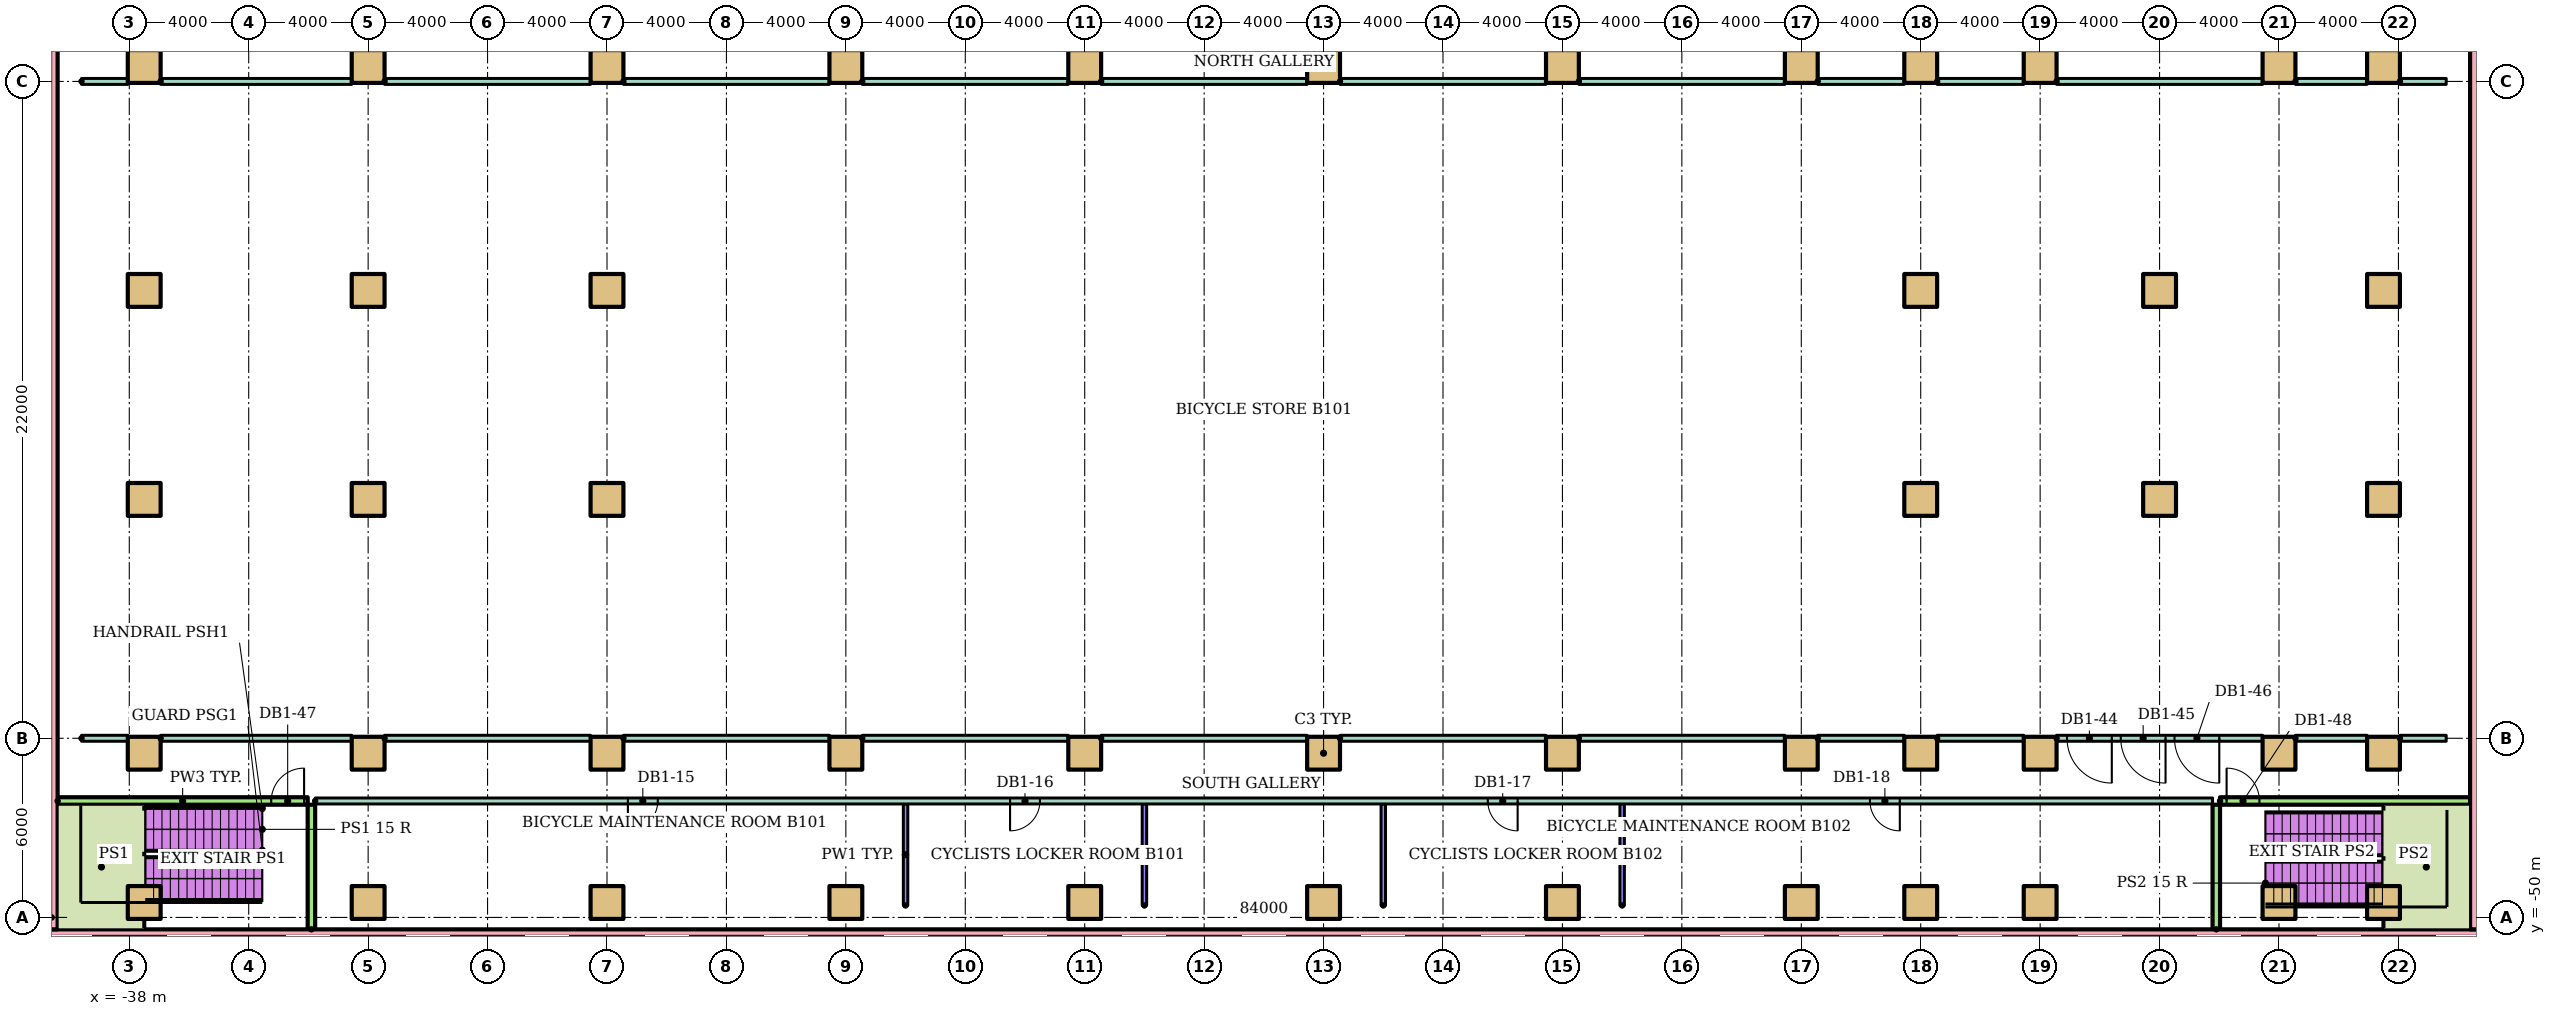
"""IFC4 building model, lengths in metres.
Left out: names, types, materials, properties, quantities, classifications, styles, units other than length and angle.
Written with IfcOpenShell. Run it as: python <this file> out.ifc"""

import sys

from ifc_helpers import new_model, si_unit, direction, frame, frame_2d, origin, origin_2d, place, context, subcontext, project, spatial, rectangle, extrude, element, fill, save


model = new_model("IFC4")
c1 = context("Model", 3, precision=1e-05, world=origin(), true_north=direction((0.0, 1.0)))
c2 = subcontext(c1, "Body", "Model", "MODEL_VIEW")
j1 = project(units=[si_unit("LENGTHUNIT", "METRE"), si_unit("PLANEANGLEUNIT", "RADIAN")], contexts=[c1])
p1 = place(None, origin())
s1 = spatial("IfcSite", under=j1, at=p1, CompositionType="ELEMENT")
p2 = place(p1, origin())
s2 = spatial("IfcBuilding", under=s1, at=p2, CompositionType="ELEMENT")
p3 = place(p2, frame((0.0, 0.0, -5.0)))
s3 = spatial("IfcBuildingStorey", under=s2, at=p3, CompositionType="ELEMENT", Elevation=-5.0)
p4 = place(p3, frame((-41.0, -50.7, -0.35)))
e1 = element("IfcWall", 1, at=p4, inside=s3, PredefinedType="SOLIDWALL", context=c2, shape_type="SweptSolid", body=[
    extrude(rectangle(XDim=82.0, YDim=0.6, at=frame_2d((41.0, 0.0))), origin(), (0.0, 0.0, 1.0), 4.93),
])
for number, where, z_axis, x_axis in (
    (2, (-40.7, -50.4, -0.35), (0.0, 0.0, 1.0), (0.0, 1.0, 0.0)),
    (3, (40.7, -50.4, -0.35), (0.0, 0.0, 1.0), (0.0, 1.0, 0.0)),
):
    element("IfcWall", number, at=place(p3, frame(where, z_axis=z_axis, x_axis=x_axis)), inside=s3, PredefinedType="SOLIDWALL", context=c2, shape_type="SweptSolid", body=[
        extrude(rectangle(XDim=70.8, YDim=0.6, at=frame_2d((35.4, 0.0))), origin(), (0.0, 0.0, 1.0), 4.93),
    ])
for number, where in (
    (4, (-37.5, -49.5, 0.0)),
    (5, (-30.0, -49.5, 0.0)),
    (6, (-22.0, -49.5, 0.0)),
    (7, (-14.0, -49.5, 0.0)),
    (8, (-6.0, -49.5, 0.0)),
    (9, (2.0, -49.5, 0.0)),
    (10, (10.0, -49.5, 0.0)),
    (11, (18.0, -49.5, 0.0)),
    (12, (22.0, -49.5, 0.0)),
    (13, (26.0, -49.5, 0.0)),
    (14, (34.0, -49.5, 0.0)),
    (15, (37.5, -49.5, 0.0)),
    (16, (-37.5, -44.5, 0.0)),
    (17, (-30.0, -44.5, 0.0)),
    (18, (-22.0, -44.5, 0.0)),
    (19, (-14.0, -44.5, 0.0)),
    (20, (-6.0, -44.5, 0.0)),
    (21, (2.0, -44.5, 0.0)),
    (22, (10.0, -44.5, 0.0)),
    (23, (18.0, -44.5, 0.0)),
    (24, (22.0, -44.5, 0.0)),
    (25, (26.0, -44.5, 0.0)),
    (26, (34.0, -44.5, 0.0)),
    (27, (37.5, -44.5, 0.0)),
    (28, (-37.5, -36.0, 0.0)),
    (29, (-30.0, -36.0, 0.0)),
    (30, (-22.0, -36.0, 0.0)),
    (31, (22.0, -36.0, 0.0)),
    (32, (30.0, -36.0, 0.0)),
    (33, (37.5, -36.0, 0.0)),
    (34, (-37.5, -29.0, 0.0)),
    (35, (-30.0, -29.0, 0.0)),
    (36, (-22.0, -29.0, 0.0)),
    (37, (22.0, -29.0, 0.0)),
    (38, (30.0, -29.0, 0.0)),
    (39, (37.5, -29.0, 0.0)),
    (40, (-37.5, -21.5, 0.0)),
    (41, (-30.0, -21.5, 0.0)),
    (42, (-22.0, -21.5, 0.0)),
    (43, (-14.0, -21.5, 0.0)),
    (44, (-6.0, -21.5, 0.0)),
    (45, (2.0, -21.5, 0.0)),
    (46, (10.0, -21.5, 0.0)),
    (47, (18.0, -21.5, 0.0)),
    (48, (22.0, -21.5, 0.0)),
    (49, (26.0, -21.5, 0.0)),
    (50, (34.0, -21.5, 0.0)),
    (51, (37.5, -21.5, 0.0)),
):
    element("IfcColumn", number, at=place(p3, frame(where)), inside=s3, PredefinedType="COLUMN", context=c2, shape_type="SweptSolid", body=[
        extrude(rectangle(XDim=1.1, YDim=1.1, at=origin_2d()), origin(), (0.0, 0.0, 1.0), 5.0),
    ])
p5 = place(p3, frame((-31.775, -46.1, 0.0)))
e52 = element("IfcWall", 52, at=p5, inside=s3, PredefinedType="PARTITIONING", context=c2, shape_type="SweptSolid", body=[
    extrude(rectangle(XDim=63.55, YDim=0.2, at=frame_2d((31.775, 0.0))), origin(), (0.0, 0.0, 1.0), 4.58),
])
p6 = place(p5, frame((10.475, 0.0, 0.0)))
e53 = element("IfcOpeningElement", 53, at=p6, cuts=e52, PredefinedType="OPENING", context=c2, shape_type="SweptSolid", body=[
    extrude(rectangle(XDim=1.0, YDim=2.1, at=frame_2d((0.5, 1.05))), frame((0.0, 0.11, 0.0), z_axis=(0.0, -1.0, 0.0), x_axis=(1.0, 0.0, 0.0)), (0.0, 0.0, 1.0), 0.22),
])
p7 = place(p5, frame((23.275, 0.0, 0.0)))
e54 = element("IfcOpeningElement", 54, at=p7, cuts=e52, PredefinedType="OPENING", context=c2, shape_type="SweptSolid", body=[
    extrude(rectangle(XDim=1.0, YDim=2.1, at=frame_2d((0.5, 1.05))), frame((0.0, 0.11, 0.0), z_axis=(0.0, -1.0, 0.0), x_axis=(1.0, 0.0, 0.0)), (0.0, 0.0, 1.0), 0.22),
])
p8 = place(p5, frame((39.275, 0.0, 0.0)))
e55 = element("IfcOpeningElement", 55, at=p8, cuts=e52, PredefinedType="OPENING", context=c2, shape_type="SweptSolid", body=[
    extrude(rectangle(XDim=1.0, YDim=2.1, at=frame_2d((0.5, 1.05))), frame((0.0, 0.11, 0.0), z_axis=(0.0, -1.0, 0.0), x_axis=(1.0, 0.0, 0.0)), (0.0, 0.0, 1.0), 0.22),
])
p9 = place(p5, frame((52.075, 0.0, 0.0)))
e56 = element("IfcOpeningElement", 56, at=p9, cuts=e52, PredefinedType="OPENING", context=c2, shape_type="SweptSolid", body=[
    extrude(rectangle(XDim=1.0, YDim=2.1, at=frame_2d((0.5, 1.05))), frame((0.0, 0.11, 0.0), z_axis=(0.0, -1.0, 0.0), x_axis=(1.0, 0.0, 0.0)), (0.0, 0.0, 1.0), 0.22),
])
p10 = place(p3, frame((-40.4, -46.1, 0.0)))
e57 = element("IfcWall", 57, at=p10, inside=s3, PredefinedType="SOLIDWALL", context=c2, shape_type="SweptSolid", body=[
    extrude(rectangle(XDim=8.375, YDim=0.25, at=frame_2d((4.188, 0.0))), origin(), (0.0, 0.0, 1.0), 4.58),
])
p11 = place(p10, frame((7.155, 0.0, 0.0)))
e58 = element("IfcOpeningElement", 58, at=p11, cuts=e57, PredefinedType="OPENING", context=c2, shape_type="SweptSolid", body=[
    extrude(rectangle(XDim=1.1, YDim=2.1, at=frame_2d((0.55, 1.05))), frame((0.0, 0.135, 0.0), z_axis=(0.0, -1.0, 0.0), x_axis=(1.0, 0.0, 0.0)), (0.0, 0.0, 1.0), 0.27),
])
p12 = place(p3, frame((32.025, -46.1, 0.0)))
e59 = element("IfcWall", 59, at=p12, inside=s3, PredefinedType="SOLIDWALL", context=c2, shape_type="SweptSolid", body=[
    extrude(rectangle(XDim=8.375, YDim=0.25, at=frame_2d((4.188, 0.0))), origin(), (0.0, 0.0, 1.0), 4.58),
])
p13 = place(p12, frame((0.22, 0.0, 0.0)))
e60 = element("IfcOpeningElement", 60, at=p13, cuts=e59, PredefinedType="OPENING", context=c2, shape_type="SweptSolid", body=[
    extrude(rectangle(XDim=1.1, YDim=2.1, at=frame_2d((0.55, 1.05))), frame((0.0, 0.135, 0.0), z_axis=(0.0, -1.0, 0.0), x_axis=(1.0, 0.0, 0.0)), (0.0, 0.0, 1.0), 0.27),
])
p14 = place(p3, frame((-39.6, -44.0, 0.0)))
e61 = element("IfcWall", 61, at=p14, inside=s3, PredefinedType="PARTITIONING", context=c2, shape_type="SweptSolid", body=[
    extrude(rectangle(XDim=1.55, YDim=0.2, at=frame_2d((0.775, 0.0))), origin(), (0.0, 0.0, 1.0), 4.58),
])
p15 = place(p3, frame((-36.95, -44.0, 0.0)))
e62 = element("IfcWall", 62, at=p15, inside=s3, PredefinedType="PARTITIONING", context=c2, shape_type="SweptSolid", body=[
    extrude(rectangle(XDim=6.4, YDim=0.2, at=frame_2d((3.2, 0.0))), origin(), (0.0, 0.0, 1.0), 4.58),
])
for number, where in (
    (63, (-29.45, -44.0, 0.0)),
    (64, (-21.45, -44.0, 0.0)),
    (65, (-13.45, -44.0, 0.0)),
    (66, (-5.45, -44.0, 0.0)),
    (67, (2.55, -44.0, 0.0)),
    (68, (10.55, -44.0, 0.0)),
):
    element("IfcWall", number, at=place(p3, frame(where)), inside=s3, PredefinedType="PARTITIONING", context=c2, shape_type="SweptSolid", body=[
        extrude(rectangle(XDim=6.9, YDim=0.2, at=frame_2d((3.45, 0.0))), origin(), (0.0, 0.0, 1.0), 4.58),
    ])
for number, where in (
    (69, (18.55, -44.0, 0.0)),
    (70, (22.55, -44.0, 0.0)),
):
    element("IfcWall", number, at=place(p3, frame(where)), inside=s3, PredefinedType="PARTITIONING", context=c2, shape_type="SweptSolid", body=[
        extrude(rectangle(XDim=2.9, YDim=0.2, at=frame_2d((1.45, 0.0))), origin(), (0.0, 0.0, 1.0), 4.58),
    ])
p16 = place(p3, frame((26.55, -44.0, 0.0)))
e71 = element("IfcWall", 71, at=p16, inside=s3, PredefinedType="PARTITIONING", context=c2, shape_type="SweptSolid", body=[
    extrude(rectangle(XDim=6.9, YDim=0.2, at=frame_2d((3.45, 0.0))), origin(), (0.0, 0.0, 1.0), 4.58),
])
p17 = place(p16, frame((0.35, 0.0, 0.0)))
e72 = element("IfcOpeningElement", 72, at=p17, cuts=e71, PredefinedType="OPENING", context=c2, shape_type="SweptSolid", body=[
    extrude(rectangle(XDim=1.5, YDim=2.1, at=frame_2d((0.75, 1.05))), frame((0.0, 0.11, 0.0), z_axis=(0.0, -1.0, 0.0), x_axis=(1.0, 0.0, 0.0)), (0.0, 0.0, 1.0), 0.22),
])
p18 = place(p16, frame((2.15, 0.0, 0.0)))
e73 = element("IfcOpeningElement", 73, at=p18, cuts=e71, PredefinedType="OPENING", context=c2, shape_type="SweptSolid", body=[
    extrude(rectangle(XDim=1.5, YDim=2.1, at=frame_2d((0.75, 1.05))), frame((0.0, 0.11, 0.0), z_axis=(0.0, -1.0, 0.0), x_axis=(1.0, 0.0, 0.0)), (0.0, 0.0, 1.0), 0.22),
])
p19 = place(p16, frame((3.95, 0.0, 0.0)))
e74 = element("IfcOpeningElement", 74, at=p19, cuts=e71, PredefinedType="OPENING", context=c2, shape_type="SweptSolid", body=[
    extrude(rectangle(XDim=1.5, YDim=2.1, at=frame_2d((0.75, 1.05))), frame((0.0, 0.11, 0.0), z_axis=(0.0, -1.0, 0.0), x_axis=(1.0, 0.0, 0.0)), (0.0, 0.0, 1.0), 0.22),
])
p20 = place(p3, frame((34.55, -44.0, 0.0)))
e75 = element("IfcWall", 75, at=p20, inside=s3, PredefinedType="PARTITIONING", context=c2, shape_type="SweptSolid", body=[
    extrude(rectangle(XDim=2.4, YDim=0.2, at=frame_2d((1.2, 0.0))), origin(), (0.0, 0.0, 1.0), 4.58),
])
for number, where in (
    (76, (38.05, -44.0, 0.0)),
    (77, (-39.6, -22.0, 0.0)),
):
    element("IfcWall", number, at=place(p3, frame(where)), inside=s3, PredefinedType="PARTITIONING", context=c2, shape_type="SweptSolid", body=[
        extrude(rectangle(XDim=1.55, YDim=0.2, at=frame_2d((0.775, 0.0))), origin(), (0.0, 0.0, 1.0), 4.58),
    ])
p21 = place(p3, frame((-36.95, -22.0, 0.0)))
e78 = element("IfcWall", 78, at=p21, inside=s3, PredefinedType="PARTITIONING", context=c2, shape_type="SweptSolid", body=[
    extrude(rectangle(XDim=6.4, YDim=0.2, at=frame_2d((3.2, 0.0))), origin(), (0.0, 0.0, 1.0), 4.58),
])
for number, where in (
    (79, (-29.45, -22.0, 0.0)),
    (80, (-21.45, -22.0, 0.0)),
    (81, (-13.45, -22.0, 0.0)),
    (82, (-5.45, -22.0, 0.0)),
    (83, (2.55, -22.0, 0.0)),
    (84, (10.55, -22.0, 0.0)),
):
    element("IfcWall", number, at=place(p3, frame(where)), inside=s3, PredefinedType="PARTITIONING", context=c2, shape_type="SweptSolid", body=[
        extrude(rectangle(XDim=6.9, YDim=0.2, at=frame_2d((3.45, 0.0))), origin(), (0.0, 0.0, 1.0), 4.58),
    ])
for number, where in (
    (85, (18.55, -22.0, 0.0)),
    (86, (22.55, -22.0, 0.0)),
):
    element("IfcWall", number, at=place(p3, frame(where)), inside=s3, PredefinedType="PARTITIONING", context=c2, shape_type="SweptSolid", body=[
        extrude(rectangle(XDim=2.9, YDim=0.2, at=frame_2d((1.45, 0.0))), origin(), (0.0, 0.0, 1.0), 4.58),
    ])
p22 = place(p3, frame((26.55, -22.0, 0.0)))
e87 = element("IfcWall", 87, at=p22, inside=s3, PredefinedType="PARTITIONING", context=c2, shape_type="SweptSolid", body=[
    extrude(rectangle(XDim=6.9, YDim=0.2, at=frame_2d((3.45, 0.0))), origin(), (0.0, 0.0, 1.0), 4.58),
])
p23 = place(p3, frame((34.55, -22.0, 0.0)))
e88 = element("IfcWall", 88, at=p23, inside=s3, PredefinedType="PARTITIONING", context=c2, shape_type="SweptSolid", body=[
    extrude(rectangle(XDim=2.4, YDim=0.2, at=frame_2d((1.2, 0.0))), origin(), (0.0, 0.0, 1.0), 4.58),
])
p24 = place(p3, frame((38.05, -22.0, 0.0)))
e89 = element("IfcWall", 89, at=p24, inside=s3, PredefinedType="PARTITIONING", context=c2, shape_type="SweptSolid", body=[
    extrude(rectangle(XDim=1.55, YDim=0.2, at=frame_2d((0.775, 0.0))), origin(), (0.0, 0.0, 1.0), 4.58),
])
p25 = place(p3, frame((-31.9, -50.4, 0.0), z_axis=(0.0, 0.0, 1.0), x_axis=(0.0, 1.0, 0.0)))
e90 = element("IfcWall", 90, at=p25, inside=s3, PredefinedType="SOLIDWALL", context=c2, shape_type="SweptSolid", body=[
    extrude(rectangle(XDim=4.175, YDim=0.25, at=frame_2d((2.087, 0.0))), origin(), (0.0, 0.0, 1.0), 4.58),
])
for number, where, z_axis, x_axis in (
    (91, (-12.0, -49.6, 0.0), (0.0, 0.0, 1.0), (0.0, 1.0, 0.0)),
    (92, (-4.0, -49.6, 0.0), (0.0, 0.0, 1.0), (0.0, 1.0, 0.0)),
    (93, (4.0, -49.6, 0.0), (0.0, 0.0, 1.0), (0.0, 1.0, 0.0)),
    (94, (12.0, -49.6, 0.0), (0.0, 0.0, 1.0), (0.0, 1.0, 0.0)),
):
    element("IfcWall", number, at=place(p3, frame(where, z_axis=z_axis, x_axis=x_axis)), inside=s3, PredefinedType="PARTITIONING", context=c2, shape_type="SweptSolid", body=[
        extrude(rectangle(XDim=3.4, YDim=0.15, at=frame_2d((1.7, 0.0))), origin(), (0.0, 0.0, 1.0), 4.58),
    ])
p26 = place(p3, frame((31.9, -50.4, 0.0), z_axis=(0.0, 0.0, 1.0), x_axis=(0.0, 1.0, 0.0)))
e95 = element("IfcWall", 95, at=p26, inside=s3, PredefinedType="SOLIDWALL", context=c2, shape_type="SweptSolid", body=[
    extrude(rectangle(XDim=4.175, YDim=0.25, at=frame_2d((2.087, 0.0))), origin(), (0.0, 0.0, 1.0), 4.58),
])
p27 = place(p6, frame((1.0, 0.0, 0.0), z_axis=(0.0, 0.0, 1.0), x_axis=(-1.0, 0.0, 0.0)))
e96 = element("IfcDoor", 96, at=p27, inside=s3, OperationType="SINGLE_SWING_LEFT", PredefinedType="DOOR", context=c2, shape_type="SweptSolid", body=[
    extrude(rectangle(XDim=1.0, YDim=2.1, at=frame_2d((0.5, 1.05))), frame((0.0, 0.025, 0.0), z_axis=(0.0, -1.0, 0.0), x_axis=(1.0, 0.0, 0.0)), (0.0, 0.0, 1.0), 0.05),
])
fill(e53, e96)
p28 = place(p7, frame((1.0, 0.0, 0.0), z_axis=(0.0, 0.0, 1.0), x_axis=(-1.0, 0.0, 0.0)))
e97 = element("IfcDoor", 97, at=p28, inside=s3, OperationType="SINGLE_SWING_LEFT", PredefinedType="DOOR", context=c2, shape_type="SweptSolid", body=[
    extrude(rectangle(XDim=1.0, YDim=2.1, at=frame_2d((0.5, 1.05))), frame((0.0, 0.025, 0.0), z_axis=(0.0, -1.0, 0.0), x_axis=(1.0, 0.0, 0.0)), (0.0, 0.0, 1.0), 0.05),
])
fill(e54, e97)
p29 = place(p8, frame((1.0, 0.0, 0.0), z_axis=(0.0, 0.0, 1.0), x_axis=(-1.0, 0.0, 0.0)))
e98 = element("IfcDoor", 98, at=p29, inside=s3, OperationType="SINGLE_SWING_RIGHT", PredefinedType="DOOR", context=c2, shape_type="SweptSolid", body=[
    extrude(rectangle(XDim=1.0, YDim=2.1, at=frame_2d((0.5, 1.05))), frame((0.0, 0.025, 0.0), z_axis=(0.0, -1.0, 0.0), x_axis=(1.0, 0.0, 0.0)), (0.0, 0.0, 1.0), 0.05),
])
fill(e55, e98)
p30 = place(p9, frame((1.0, 0.0, 0.0), z_axis=(0.0, 0.0, 1.0), x_axis=(-1.0, 0.0, 0.0)))
e99 = element("IfcDoor", 99, at=p30, inside=s3, OperationType="SINGLE_SWING_RIGHT", PredefinedType="DOOR", context=c2, shape_type="SweptSolid", body=[
    extrude(rectangle(XDim=1.0, YDim=2.1, at=frame_2d((0.5, 1.05))), frame((0.0, 0.025, 0.0), z_axis=(0.0, -1.0, 0.0), x_axis=(1.0, 0.0, 0.0)), (0.0, 0.0, 1.0), 0.05),
])
fill(e56, e99)
p31 = place(p17, frame((1.5, 0.0, 0.0), z_axis=(0.0, 0.0, 1.0), x_axis=(-1.0, 0.0, 0.0)))
e100 = element("IfcDoor", 100, at=p31, inside=s3, OperationType="DOUBLE_DOOR_SINGLE_SWING", PredefinedType="DOOR", context=c2, shape_type="SweptSolid", body=[
    extrude(rectangle(XDim=1.5, YDim=2.1, at=frame_2d((0.75, 1.05))), frame((0.0, 0.025, 0.0), z_axis=(0.0, -1.0, 0.0), x_axis=(1.0, 0.0, 0.0)), (0.0, 0.0, 1.0), 0.05),
])
fill(e72, e100)
p32 = place(p18, frame((1.5, 0.0, 0.0), z_axis=(0.0, 0.0, 1.0), x_axis=(-1.0, 0.0, 0.0)))
e101 = element("IfcDoor", 101, at=p32, inside=s3, OperationType="DOUBLE_DOOR_SINGLE_SWING", PredefinedType="DOOR", context=c2, shape_type="SweptSolid", body=[
    extrude(rectangle(XDim=1.5, YDim=2.1, at=frame_2d((0.75, 1.05))), frame((0.0, 0.025, 0.0), z_axis=(0.0, -1.0, 0.0), x_axis=(1.0, 0.0, 0.0)), (0.0, 0.0, 1.0), 0.05),
])
fill(e73, e101)
p33 = place(p19, frame((1.5, 0.0, 0.0), z_axis=(0.0, 0.0, 1.0), x_axis=(-1.0, 0.0, 0.0)))
e102 = element("IfcDoor", 102, at=p33, inside=s3, OperationType="DOUBLE_DOOR_SINGLE_SWING", PredefinedType="DOOR", context=c2, shape_type="SweptSolid", body=[
    extrude(rectangle(XDim=1.5, YDim=2.1, at=frame_2d((0.75, 1.05))), frame((0.0, 0.025, 0.0), z_axis=(0.0, -1.0, 0.0), x_axis=(1.0, 0.0, 0.0)), (0.0, 0.0, 1.0), 0.05),
])
fill(e74, e102)
p34 = place(p11, origin())
e103 = element("IfcDoor", 103, at=p34, inside=s3, OperationType="SINGLE_SWING_RIGHT", PredefinedType="DOOR", context=c2, shape_type="SweptSolid", body=[
    extrude(rectangle(XDim=1.1, YDim=2.1, at=frame_2d((0.55, 1.05))), frame((0.0, 0.025, 0.0), z_axis=(0.0, -1.0, 0.0), x_axis=(1.0, 0.0, 0.0)), (0.0, 0.0, 1.0), 0.05),
])
fill(e58, e103)
p35 = place(p13, origin())
e104 = element("IfcDoor", 104, at=p35, inside=s3, OperationType="SINGLE_SWING_LEFT", PredefinedType="DOOR", context=c2, shape_type="SweptSolid", body=[
    extrude(rectangle(XDim=1.1, YDim=2.1, at=frame_2d((0.55, 1.05))), frame((0.0, 0.025, 0.0), z_axis=(0.0, -1.0, 0.0), x_axis=(1.0, 0.0, 0.0)), (0.0, 0.0, 1.0), 0.05),
])
fill(e60, e104)
save(model, sys.argv[1])
